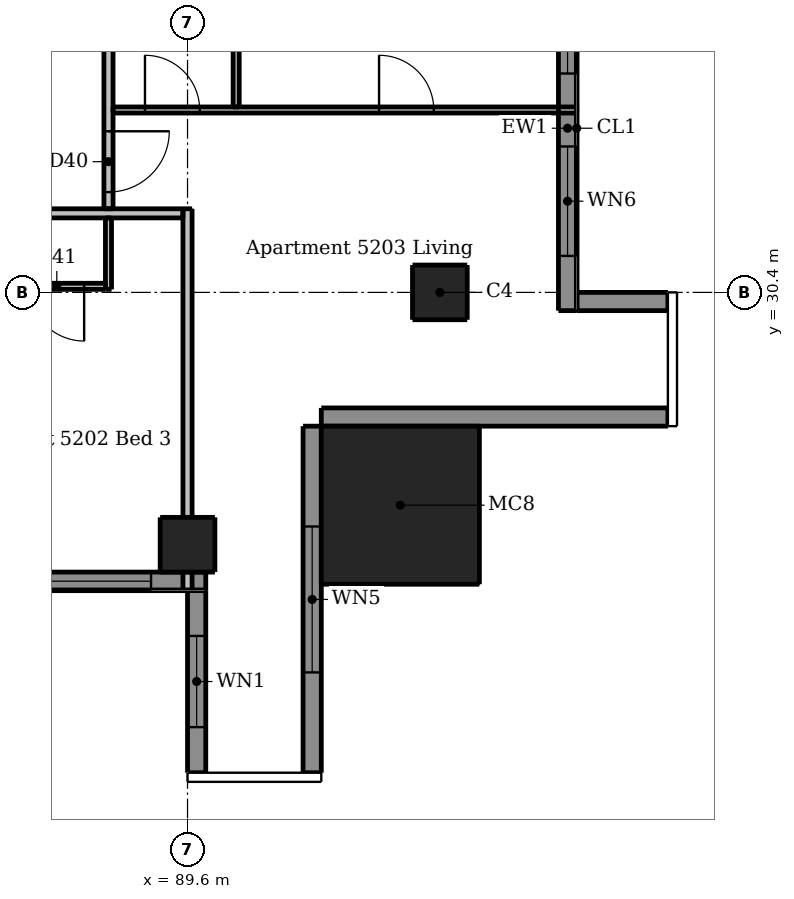
"""IFC4 building model, lengths in metres.
Left out: names, types, materials, properties, quantities, classifications, styles, units other than length and angle.
Written with IfcOpenShell. Run it as: python <this file> out.ifc"""

import sys

from ifc_helpers import new_model, si_unit, direction, frame, frame_2d, origin, origin_2d, place, context, subcontext, project, spatial, rectangle, extrude, element, fill, save


model = new_model("IFC4")
c1 = context("Model", 3, precision=1e-05, world=origin(), true_north=direction((0.0, 1.0)))
c2 = subcontext(c1, "Body", "Model", "MODEL_VIEW")
j1 = project(units=[si_unit("LENGTHUNIT", "METRE"), si_unit("PLANEANGLEUNIT", "RADIAN")], contexts=[c1])
p1 = place(None, origin())
s1 = spatial("IfcSite", under=j1, at=p1, CompositionType="ELEMENT")
p2 = place(p1, origin())
s2 = spatial("IfcBuilding", under=s1, at=p2, CompositionType="ELEMENT")
p3 = place(p2, frame((0.0, 0.0, 196.9)))
s3 = spatial("IfcBuildingStorey", under=s2, at=p3, CompositionType="ELEMENT", Elevation=196.9)
for number, where, z_axis, x_axis in (
    (1, (89.6, 26.25, 0.0), (0.0, 0.0, 1.0), (1.0, 0.0, 0.0)),
    (2, (93.75, 30.4, 0.0), (0.0, 0.0, 1.0), (1.0, 0.0, 0.0)),
):
    element("IfcColumn", number, at=place(p3, frame(where, z_axis=z_axis, x_axis=x_axis)), inside=s3, PredefinedType="COLUMN", context=c2, shape_type="SweptSolid", body=[
        extrude(rectangle(XDim=0.9, YDim=0.9, at=origin_2d()), origin(), (0.0, 0.0, 1.0), 3.05),
    ])
p4 = place(p3, frame((93.1, 26.9, 0.0), z_axis=(0.0, 0.0, 1.0), x_axis=(1.0, 0.0, 0.0)))
e3 = element("IfcColumn", 3, at=p4, inside=s3, PredefinedType="COLUMN", context=c2, shape_type="SweptSolid", body=[
    extrude(rectangle(XDim=2.6, YDim=2.6, at=origin_2d()), origin(), (0.0, 0.0, 1.0), 3.3),
])
p5 = place(p3, frame((89.75, 25.5, 0.0), z_axis=(0.0, 0.0, 1.0), x_axis=(0.0, -1.0, 0.0)))
e4 = element("IfcWall", 4, at=p5, inside=s3, PredefinedType="SOLIDWALL", context=c2, shape_type="SweptSolid", body=[
    extrude(rectangle(XDim=3.0, YDim=0.3, at=frame_2d((1.5, 0.0))), origin(), (0.0, 0.0, 1.0), 3.05),
])
p6 = place(p5, frame((0.75, 0.0, 0.9)))
e5 = element("IfcOpeningElement", 5, at=p6, cuts=e4, PredefinedType="OPENING", context=c2, shape_type="SweptSolid", body=[
    extrude(rectangle(XDim=1.5, YDim=1.5, at=frame_2d((0.75, 0.75))), frame((0.0, 0.16, 0.0), z_axis=(0.0, -1.0, 0.0), x_axis=(1.0, 0.0, 0.0)), (0.0, 0.0, 1.0), 0.32),
])
p7 = place(p3, frame((91.65, 22.5, 0.0), z_axis=(0.0, 0.0, 1.0), x_axis=(0.0, 1.0, 0.0)))
e6 = element("IfcWall", 6, at=p7, inside=s3, PredefinedType="SOLIDWALL", context=c2, shape_type="SweptSolid", body=[
    extrude(rectangle(XDim=5.7, YDim=0.3, at=frame_2d((2.85, 0.0))), origin(), (0.0, 0.0, 1.0), 3.05),
])
p8 = place(p7, frame((1.65, 0.0, 0.15)))
e7 = element("IfcOpeningElement", 7, at=p8, cuts=e6, PredefinedType="OPENING", context=c2, shape_type="SweptSolid", body=[
    extrude(rectangle(XDim=2.4, YDim=2.1, at=frame_2d((1.2, 1.05))), frame((0.0, 0.16, 0.0), z_axis=(0.0, -1.0, 0.0), x_axis=(1.0, 0.0, 0.0)), (0.0, 0.0, 1.0), 0.32),
])
p9 = place(p3, frame((91.8, 28.35, 0.0), z_axis=(0.0, 0.0, 1.0), x_axis=(1.0, 0.0, 0.0)))
e8 = element("IfcWall", 8, at=p9, inside=s3, PredefinedType="SOLIDWALL", context=c2, shape_type="SweptSolid", body=[
    extrude(rectangle(XDim=5.7, YDim=0.3, at=frame_2d((2.85, 0.0))), origin(), (0.0, 0.0, 1.0), 3.05),
])
p10 = place(p3, frame((97.5, 30.25, 0.0), z_axis=(0.0, 0.0, 1.0), x_axis=(-1.0, 0.0, 0.0)))
e9 = element("IfcWall", 9, at=p10, inside=s3, PredefinedType="SOLIDWALL", context=c2, shape_type="SweptSolid", body=[
    extrude(rectangle(XDim=1.5, YDim=0.3, at=frame_2d((0.75, 0.0))), origin(), (0.0, 0.0, 1.0), 3.05),
])
p11 = place(p3, frame((83.6, 25.65, 0.0), z_axis=(0.0, 0.0, 1.0), x_axis=(1.0, 0.0, 0.0)))
e10 = element("IfcWall", 10, at=p11, inside=s3, PredefinedType="SOLIDWALL", context=c2, shape_type="SweptSolid", body=[
    extrude(rectangle(XDim=6.3, YDim=0.3, at=frame_2d((3.15, 0.0))), origin(), (0.0, 0.0, 1.0), 3.05),
])
p12 = place(p11, frame((0.6, 0.0, 0.15)))
e11 = element("IfcOpeningElement", 11, at=p12, cuts=e10, PredefinedType="OPENING", context=c2, shape_type="SweptSolid", body=[
    extrude(rectangle(XDim=1.8, YDim=2.1, at=frame_2d((0.9, 1.05))), frame((0.0, 0.16, 0.0), z_axis=(0.0, -1.0, 0.0), x_axis=(1.0, 0.0, 0.0)), (0.0, 0.0, 1.0), 0.32),
])
p13 = place(p11, frame((3.6, 0.0, 0.15)))
e12 = element("IfcOpeningElement", 12, at=p13, cuts=e10, PredefinedType="OPENING", context=c2, shape_type="SweptSolid", body=[
    extrude(rectangle(XDim=1.8, YDim=2.1, at=frame_2d((0.9, 1.05))), frame((0.0, 0.16, 0.0), z_axis=(0.0, -1.0, 0.0), x_axis=(1.0, 0.0, 0.0)), (0.0, 0.0, 1.0), 0.32),
])
p14 = place(p3, frame((95.85, 30.1, 0.0), z_axis=(0.0, 0.0, 1.0), x_axis=(0.0, 1.0, 0.0)))
e13 = element("IfcWall", 13, at=p14, inside=s3, PredefinedType="SOLIDWALL", context=c2, shape_type="SweptSolid", body=[
    extrude(rectangle(XDim=6.0, YDim=0.3, at=frame_2d((3.0, 0.0))), origin(), (0.0, 0.0, 1.0), 3.05),
])
p15 = place(p14, frame((0.9, 0.0, 0.15)))
e14 = element("IfcOpeningElement", 14, at=p15, cuts=e13, PredefinedType="OPENING", context=c2, shape_type="SweptSolid", body=[
    extrude(rectangle(XDim=1.8, YDim=2.1, at=frame_2d((0.9, 1.05))), frame((0.0, 0.16, 0.0), z_axis=(0.0, -1.0, 0.0), x_axis=(1.0, 0.0, 0.0)), (0.0, 0.0, 1.0), 0.32),
])
p16 = place(p14, frame((3.9, 0.0, 0.15)))
e15 = element("IfcOpeningElement", 15, at=p16, cuts=e13, PredefinedType="OPENING", context=c2, shape_type="SweptSolid", body=[
    extrude(rectangle(XDim=1.8, YDim=2.1, at=frame_2d((0.9, 1.05))), frame((0.0, 0.16, 0.0), z_axis=(0.0, -1.0, 0.0), x_axis=(1.0, 0.0, 0.0)), (0.0, 0.0, 1.0), 0.32),
])
p17 = place(p3, frame((88.3, 30.45, 0.0), z_axis=(0.0, 0.0, 1.0), x_axis=(0.0, 1.0, 0.0)))
e16 = element("IfcWall", 16, at=p17, inside=s3, PredefinedType="PARTITIONING", context=c2, shape_type="SweptSolid", body=[
    extrude(rectangle(XDim=1.175, YDim=0.1, at=frame_2d((0.587, 0.0))), origin(), (0.0, 0.0, 1.0), 3.05),
])
p18 = place(p3, frame((90.4, 33.45, 0.0), z_axis=(0.0, 0.0, 1.0), x_axis=(0.0, 1.0, 0.0)))
e17 = element("IfcWall", 17, at=p18, inside=s3, PredefinedType="PARTITIONING", context=c2, shape_type="SweptSolid", body=[
    extrude(rectangle(XDim=5.875, YDim=0.1, at=frame_2d((2.938, 0.0))), origin(), (0.0, 0.0, 1.0), 3.05),
])
p19 = place(p18, frame((3.75, 0.0, 0.0)))
e18 = element("IfcOpeningElement", 18, at=p19, cuts=e17, PredefinedType="OPENING", context=c2, shape_type="SweptSolid", body=[
    extrude(rectangle(XDim=0.8, YDim=2.1, at=frame_2d((0.4, 1.05))), frame((0.0, 0.06, 0.0), z_axis=(0.0, -1.0, 0.0), x_axis=(1.0, 0.0, 0.0)), (0.0, 0.0, 1.0), 0.12),
])
p20 = place(p3, frame((88.375, 33.4, 0.0), z_axis=(0.0, 0.0, 1.0), x_axis=(1.0, 0.0, 0.0)))
e19 = element("IfcWall", 19, at=p20, inside=s3, PredefinedType="PARTITIONING", context=c2, shape_type="SweptSolid", body=[
    extrude(rectangle(XDim=7.625, YDim=0.1, at=frame_2d((3.812, 0.0))), origin(), (0.0, 0.0, 1.0), 3.05),
])
p21 = place(p20, frame((0.525, 0.0, 0.0)))
e20 = element("IfcOpeningElement", 20, at=p21, cuts=e19, PredefinedType="OPENING", context=c2, shape_type="SweptSolid", body=[
    extrude(rectangle(XDim=0.9, YDim=2.1, at=frame_2d((0.45, 1.05))), frame((0.0, 0.06, 0.0), z_axis=(0.0, -1.0, 0.0), x_axis=(1.0, 0.0, 0.0)), (0.0, 0.0, 1.0), 0.12),
])
p22 = place(p20, frame((4.375, 0.0, 0.0)))
e21 = element("IfcOpeningElement", 21, at=p22, cuts=e19, PredefinedType="OPENING", context=c2, shape_type="SweptSolid", body=[
    extrude(rectangle(XDim=0.9, YDim=2.1, at=frame_2d((0.45, 1.05))), frame((0.0, 0.06, 0.0), z_axis=(0.0, -1.0, 0.0), x_axis=(1.0, 0.0, 0.0)), (0.0, 0.0, 1.0), 0.12),
])
p23 = place(p3, frame((88.25, 30.5, 0.0), z_axis=(0.0, 0.0, 1.0), x_axis=(-1.0, 0.0, 0.0)))
e22 = element("IfcWall", 22, at=p23, inside=s3, PredefinedType="PARTITIONING", context=c2, shape_type="SweptSolid", body=[
    extrude(rectangle(XDim=16.575, YDim=0.1, at=frame_2d((8.288, 0.0))), origin(), (0.0, 0.0, 1.0), 3.05),
])
p24 = place(p23, frame((15.3, 0.0, 0.0)))
e23 = element("IfcOpeningElement", 23, at=p24, cuts=e22, PredefinedType="OPENING", context=c2, shape_type="SweptSolid", body=[
    extrude(rectangle(XDim=0.9, YDim=2.1, at=frame_2d((0.45, 1.05))), frame((0.0, 0.06, 0.0), z_axis=(0.0, -1.0, 0.0), x_axis=(1.0, 0.0, 0.0)), (0.0, 0.0, 1.0), 0.12),
])
p25 = place(p23, frame((11.4, 0.0, 0.0)))
e24 = element("IfcOpeningElement", 24, at=p25, cuts=e22, PredefinedType="OPENING", context=c2, shape_type="SweptSolid", body=[
    extrude(rectangle(XDim=0.9, YDim=2.1, at=frame_2d((0.45, 1.05))), frame((0.0, 0.06, 0.0), z_axis=(0.0, -1.0, 0.0), x_axis=(1.0, 0.0, 0.0)), (0.0, 0.0, 1.0), 0.12),
])
p26 = place(p23, frame((13.5, 0.0, 0.0)))
e25 = element("IfcOpeningElement", 25, at=p26, cuts=e22, PredefinedType="OPENING", context=c2, shape_type="SweptSolid", body=[
    extrude(rectangle(XDim=0.9, YDim=2.1, at=frame_2d((0.45, 1.05))), frame((0.0, 0.06, 0.0), z_axis=(0.0, -1.0, 0.0), x_axis=(1.0, 0.0, 0.0)), (0.0, 0.0, 1.0), 0.12),
])
p27 = place(p23, frame((8.7, 0.0, 0.0)))
e26 = element("IfcOpeningElement", 26, at=p27, cuts=e22, PredefinedType="OPENING", context=c2, shape_type="SweptSolid", body=[
    extrude(rectangle(XDim=0.9, YDim=2.1, at=frame_2d((0.45, 1.05))), frame((0.0, 0.06, 0.0), z_axis=(0.0, -1.0, 0.0), x_axis=(1.0, 0.0, 0.0)), (0.0, 0.0, 1.0), 0.12),
])
p28 = place(p23, frame((3.0, 0.0, 0.0)))
e27 = element("IfcOpeningElement", 27, at=p28, cuts=e22, PredefinedType="OPENING", context=c2, shape_type="SweptSolid", body=[
    extrude(rectangle(XDim=0.9, YDim=2.1, at=frame_2d((0.45, 1.05))), frame((0.0, 0.06, 0.0), z_axis=(0.0, -1.0, 0.0), x_axis=(1.0, 0.0, 0.0)), (0.0, 0.0, 1.0), 0.12),
])
p29 = place(p23, frame((0.35, 0.0, 0.0)))
e28 = element("IfcOpeningElement", 28, at=p29, cuts=e22, PredefinedType="OPENING", context=c2, shape_type="SweptSolid", body=[
    extrude(rectangle(XDim=0.9, YDim=2.1, at=frame_2d((0.45, 1.05))), frame((0.0, 0.06, 0.0), z_axis=(0.0, -1.0, 0.0), x_axis=(1.0, 0.0, 0.0)), (0.0, 0.0, 1.0), 0.12),
])
p30 = place(p23, frame((6.05, 0.0, 0.0)))
e29 = element("IfcOpeningElement", 29, at=p30, cuts=e22, PredefinedType="OPENING", context=c2, shape_type="SweptSolid", body=[
    extrude(rectangle(XDim=0.8, YDim=2.1, at=frame_2d((0.4, 1.05))), frame((0.0, 0.06, 0.0), z_axis=(0.0, -1.0, 0.0), x_axis=(1.0, 0.0, 0.0)), (0.0, 0.0, 1.0), 0.12),
])
p31 = place(p3, frame((88.3, 61.175, 0.0), z_axis=(0.0, 0.0, 1.0), x_axis=(0.0, -1.0, 0.0)))
e30 = element("IfcWall", 30, at=p31, inside=s3, PredefinedType="PARTITIONING", context=c2, shape_type="SweptSolid", body=[
    extrude(rectangle(XDim=29.4, YDim=0.15, at=frame_2d((14.7, 0.0))), origin(), (0.0, 0.0, 1.0), 3.05),
])
p32 = place(p31, frame((28.125, 0.0, 0.0)))
e31 = element("IfcOpeningElement", 31, at=p32, cuts=e30, PredefinedType="OPENING", context=c2, shape_type="SweptSolid", body=[
    extrude(rectangle(XDim=1.0, YDim=2.1, at=frame_2d((0.5, 1.05))), frame((0.0, 0.085, 0.0), z_axis=(0.0, -1.0, 0.0), x_axis=(1.0, 0.0, 0.0)), (0.0, 0.0, 1.0), 0.17),
])
p33 = place(p31, frame((10.775, 0.0, 0.0)))
e32 = element("IfcOpeningElement", 32, at=p33, cuts=e30, PredefinedType="OPENING", context=c2, shape_type="SweptSolid", body=[
    extrude(rectangle(XDim=1.0, YDim=2.1, at=frame_2d((0.5, 1.05))), frame((0.0, 0.085, 0.0), z_axis=(0.0, -1.0, 0.0), x_axis=(1.0, 0.0, 0.0)), (0.0, 0.0, 1.0), 0.17),
])
p34 = place(p3, frame((89.6, 25.5, 0.0), z_axis=(0.0, 0.0, 1.0), x_axis=(0.0, 1.0, 0.0)))
e33 = element("IfcWall", 33, at=p34, inside=s3, PredefinedType="PARTITIONING", context=c2, shape_type="SweptSolid", body=[
    extrude(rectangle(XDim=6.275, YDim=0.15, at=frame_2d((3.137, 0.0))), origin(), (0.0, 0.0, 1.0), 2.516),
])
p35 = place(p3, frame((89.525, 31.7, 0.0), z_axis=(0.0, 0.0, 1.0), x_axis=(-1.0, 0.0, 0.0)))
e34 = element("IfcWall", 34, at=p35, inside=s3, PredefinedType="PARTITIONING", context=c2, shape_type="SweptSolid", body=[
    extrude(rectangle(XDim=30.55, YDim=0.15, at=frame_2d((15.275, 0.0))), origin(), (0.0, 0.0, 1.0), 3.05),
])
p36 = place(p35, frame((26.775, 0.0, 0.0)))
e35 = element("IfcOpeningElement", 35, at=p36, cuts=e34, PredefinedType="OPENING", context=c2, shape_type="SweptSolid", body=[
    extrude(rectangle(XDim=1.0, YDim=2.1, at=frame_2d((0.5, 1.05))), frame((0.0, 0.085, 0.0), z_axis=(0.0, -1.0, 0.0), x_axis=(1.0, 0.0, 0.0)), (0.0, 0.0, 1.0), 0.17),
])
p37 = place(p35, frame((9.075, 0.0, 0.0)))
e36 = element("IfcOpeningElement", 36, at=p37, cuts=e34, PredefinedType="OPENING", context=c2, shape_type="SweptSolid", body=[
    extrude(rectangle(XDim=1.0, YDim=2.1, at=frame_2d((0.5, 1.05))), frame((0.0, 0.085, 0.0), z_axis=(0.0, -1.0, 0.0), x_axis=(1.0, 0.0, 0.0)), (0.0, 0.0, 1.0), 0.17),
])
p38 = place(p6, origin())
e37 = element("IfcWindow", 37, at=p38, inside=s3, PartitioningType="DOUBLE_PANEL_VERTICAL", PredefinedType="WINDOW", context=c2, shape_type="SweptSolid", body=[
    extrude(rectangle(XDim=1.5, YDim=1.5, at=frame_2d((0.75, 0.75))), frame((0.0, 0.03, 0.0), z_axis=(0.0, -1.0, 0.0), x_axis=(1.0, 0.0, 0.0)), (0.0, 0.0, 1.0), 0.06),
])
fill(e5, e37)
p39 = place(p8, origin())
e38 = element("IfcWindow", 38, at=p39, inside=s3, PartitioningType="DOUBLE_PANEL_VERTICAL", PredefinedType="WINDOW", context=c2, shape_type="SweptSolid", body=[
    extrude(rectangle(XDim=2.4, YDim=2.1, at=frame_2d((1.2, 1.05))), frame((0.0, 0.03, 0.0), z_axis=(0.0, -1.0, 0.0), x_axis=(1.0, 0.0, 0.0)), (0.0, 0.0, 1.0), 0.06),
])
fill(e7, e38)
p40 = place(p13, origin())
e39 = element("IfcWindow", 39, at=p40, inside=s3, PartitioningType="DOUBLE_PANEL_VERTICAL", PredefinedType="WINDOW", context=c2, shape_type="SweptSolid", body=[
    extrude(rectangle(XDim=1.8, YDim=2.1, at=frame_2d((0.9, 1.05))), frame((0.0, 0.03, 0.0), z_axis=(0.0, -1.0, 0.0), x_axis=(1.0, 0.0, 0.0)), (0.0, 0.0, 1.0), 0.06),
])
fill(e12, e39)
p41 = place(p15, origin())
e40 = element("IfcWindow", 40, at=p41, inside=s3, PartitioningType="DOUBLE_PANEL_VERTICAL", PredefinedType="WINDOW", context=c2, shape_type="SweptSolid", body=[
    extrude(rectangle(XDim=1.8, YDim=2.1, at=frame_2d((0.9, 1.05))), frame((0.0, 0.03, 0.0), z_axis=(0.0, -1.0, 0.0), x_axis=(1.0, 0.0, 0.0)), (0.0, 0.0, 1.0), 0.06),
])
fill(e14, e40)
p42 = place(p16, origin())
e41 = element("IfcWindow", 41, at=p42, inside=s3, PartitioningType="DOUBLE_PANEL_VERTICAL", PredefinedType="WINDOW", context=c2, shape_type="SweptSolid", body=[
    extrude(rectangle(XDim=1.8, YDim=2.1, at=frame_2d((0.9, 1.05))), frame((0.0, 0.03, 0.0), z_axis=(0.0, -1.0, 0.0), x_axis=(1.0, 0.0, 0.0)), (0.0, 0.0, 1.0), 0.06),
])
fill(e15, e41)
p43 = place(p29, origin())
e42 = element("IfcDoor", 42, at=p43, inside=s3, OperationType="SINGLE_SWING_LEFT", PredefinedType="DOOR", context=c2, shape_type="SweptSolid", body=[
    extrude(rectangle(XDim=0.9, YDim=2.1, at=frame_2d((0.45, 1.05))), frame((0.0, 0.025, 0.0), z_axis=(0.0, -1.0, 0.0), x_axis=(1.0, 0.0, 0.0)), (0.0, 0.0, 1.0), 0.05),
])
fill(e28, e42)
p44 = place(p32, origin())
e43 = element("IfcDoor", 43, at=p44, inside=s3, OperationType="SINGLE_SWING_LEFT", PredefinedType="DOOR", context=c2, shape_type="SweptSolid", body=[
    extrude(rectangle(XDim=1.0, YDim=2.1, at=frame_2d((0.5, 1.05))), frame((0.0, 0.025, 0.0), z_axis=(0.0, -1.0, 0.0), x_axis=(1.0, 0.0, 0.0)), (0.0, 0.0, 1.0), 0.05),
])
fill(e31, e43)
p45 = place(p21, origin())
e44 = element("IfcDoor", 44, at=p45, inside=s3, OperationType="SINGLE_SWING_LEFT", PredefinedType="DOOR", context=c2, shape_type="SweptSolid", body=[
    extrude(rectangle(XDim=0.9, YDim=2.1, at=frame_2d((0.45, 1.05))), frame((0.0, 0.025, 0.0), z_axis=(0.0, -1.0, 0.0), x_axis=(1.0, 0.0, 0.0)), (0.0, 0.0, 1.0), 0.05),
])
fill(e20, e44)
p46 = place(p22, origin())
e45 = element("IfcDoor", 45, at=p46, inside=s3, OperationType="SINGLE_SWING_LEFT", PredefinedType="DOOR", context=c2, shape_type="SweptSolid", body=[
    extrude(rectangle(XDim=0.9, YDim=2.1, at=frame_2d((0.45, 1.05))), frame((0.0, 0.025, 0.0), z_axis=(0.0, -1.0, 0.0), x_axis=(1.0, 0.0, 0.0)), (0.0, 0.0, 1.0), 0.05),
])
fill(e21, e45)
save(model, sys.argv[1])
